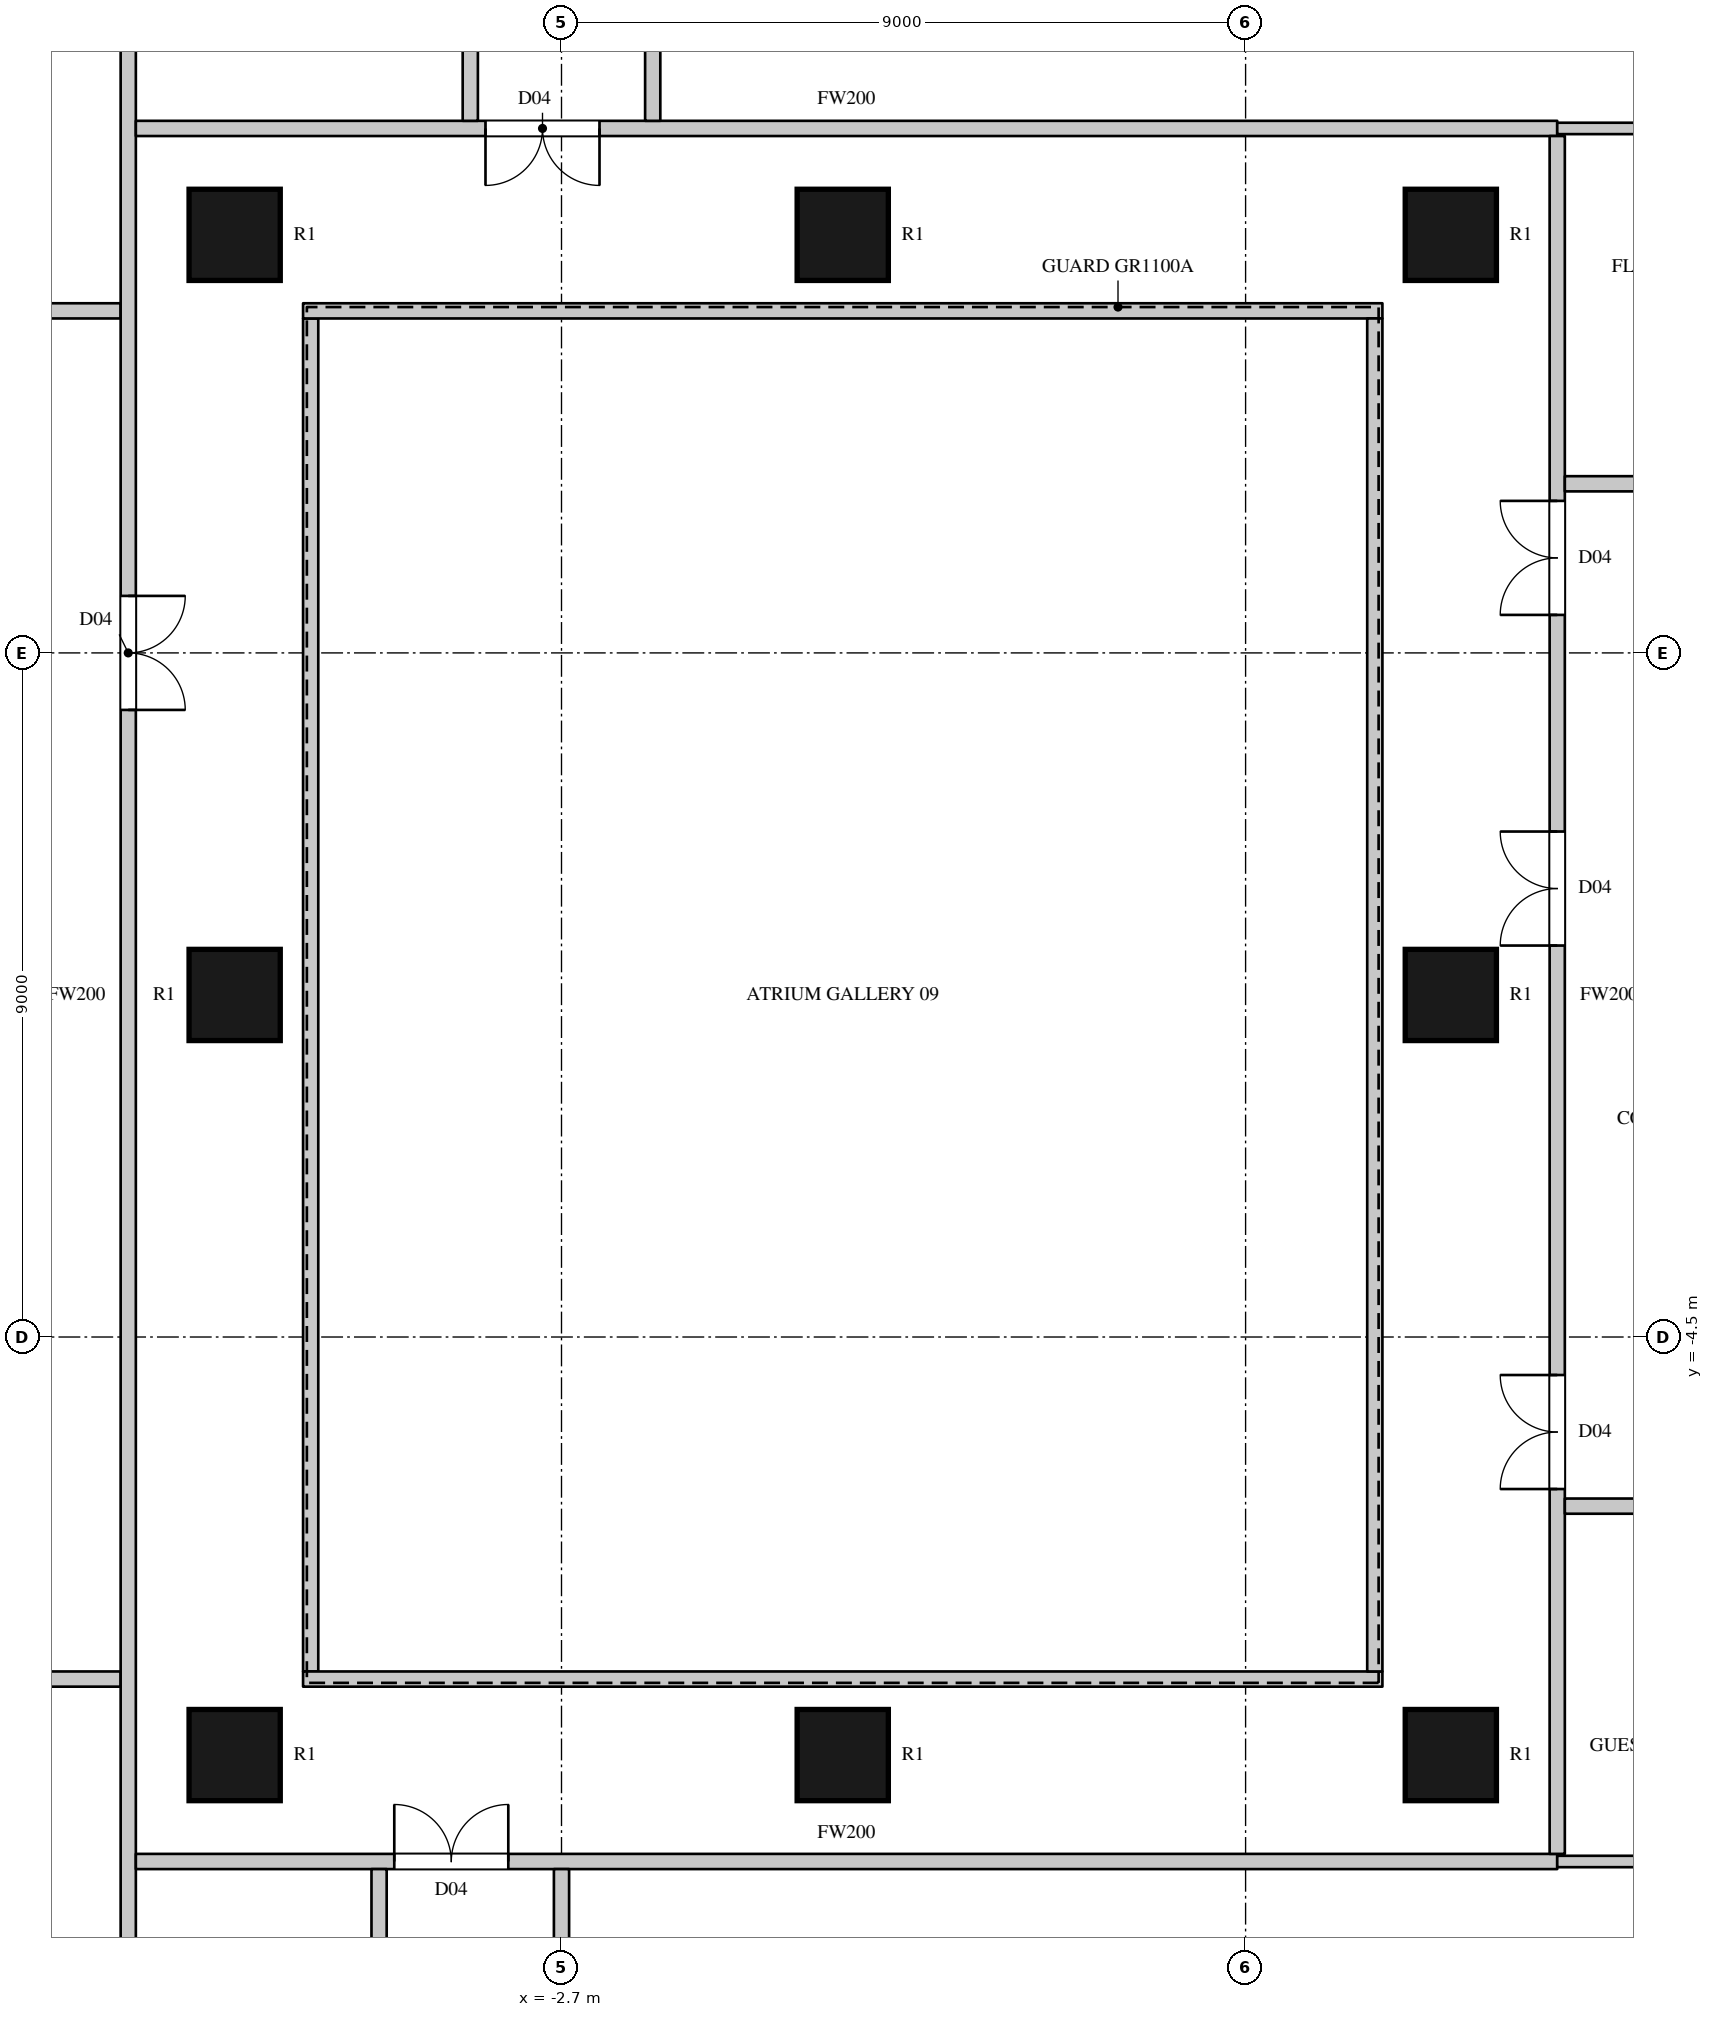
"""IFC4 building model, lengths in metres.
Left out: names, types, materials, properties, quantities, classifications, styles, units other than length and angle.
Written with IfcOpenShell. Run it as: python <this file> out.ifc"""

import sys

from ifc_helpers import new_model, si_unit, direction, frame, frame_2d, origin, origin_2d, place, context, subcontext, project, spatial, rectangle, circle, extrude, element, fill, save


model = new_model("IFC4")
c1 = context("Model", 3, precision=1e-05, world=origin(), true_north=direction((0.0, 1.0)))
c2 = subcontext(c1, "Body", "Model", "MODEL_VIEW")
j1 = project(units=[si_unit("LENGTHUNIT", "METRE"), si_unit("PLANEANGLEUNIT", "RADIAN")], contexts=[c1])
p1 = place(None, origin())
s1 = spatial("IfcSite", under=j1, at=p1, CompositionType="ELEMENT")
p2 = place(p1, origin())
s2 = spatial("IfcBuilding", under=s1, at=p2, CompositionType="ELEMENT")
p3 = place(p2, frame((0.0, 0.0, 62.7)))
s3 = spatial("IfcBuildingStorey", under=s2, at=p3, CompositionType="ELEMENT", Elevation=62.7)
for number, where, z_axis, x_axis in (
    (1, (-7.0, -10.0, 0.0), (0.0, 0.0, 1.0), (1.0, 0.0, 0.0)),
    (2, (-7.0, 0.0, 0.0), (0.0, 0.0, 1.0), (1.0, 0.0, 0.0)),
    (3, (-7.0, 10.0, 0.0), (0.0, 0.0, 1.0), (1.0, 0.0, 0.0)),
    (4, (1.0, -10.0, 0.0), (0.0, 0.0, 1.0), (1.0, 0.0, 0.0)),
    (5, (1.0, 10.0, 0.0), (0.0, 0.0, 1.0), (1.0, 0.0, 0.0)),
    (6, (9.0, -10.0, 0.0), (0.0, 0.0, 1.0), (1.0, 0.0, 0.0)),
    (7, (9.0, 0.0, 0.0), (0.0, 0.0, 1.0), (1.0, 0.0, 0.0)),
    (8, (9.0, 10.0, 0.0), (0.0, 0.0, 1.0), (1.0, 0.0, 0.0)),
):
    element("IfcColumn", number, at=place(p3, frame(where, z_axis=z_axis, x_axis=x_axis)), inside=s3, PredefinedType="COLUMN", context=c2, shape_type="SweptSolid", body=[
        extrude(circle(Radius=0.6, at=origin_2d()), origin(), (0.0, 0.0, 1.0), 3.6),
    ])
p4 = place(p3, frame((-13.97, -9.0, 0.0), z_axis=(0.0, 0.0, 1.0), x_axis=(1.0, 0.0, 0.0)))
e9 = element("IfcWall", 9, at=p4, inside=s3, PredefinedType="PARTITIONING", context=c2, shape_type="SweptSolid", body=[
    extrude(rectangle(XDim=5.47, YDim=0.2, at=frame_2d((2.735, 0.0))), origin(), (0.0, 0.0, 1.0), 3.3),
])
p5 = place(p4, frame((0.4, 0.0, 0.0)))
e10 = element("IfcOpeningElement", 10, at=p5, cuts=e9, PredefinedType="OPENING", context=c2, shape_type="SweptSolid", body=[
    extrude(rectangle(XDim=1.5, YDim=2.2, at=frame_2d((0.75, 1.1))), frame((0.0, 0.11, 0.0), z_axis=(0.0, -1.0, 0.0), x_axis=(1.0, 0.0, 0.0)), (0.0, 0.0, 1.0), 0.22),
])
p6 = place(p4, frame((2.05, 0.0, 0.0)))
e11 = element("IfcOpeningElement", 11, at=p6, cuts=e9, PredefinedType="OPENING", context=c2, shape_type="SweptSolid", body=[
    extrude(rectangle(XDim=1.5, YDim=2.2, at=frame_2d((0.75, 1.1))), frame((0.0, 0.11, 0.0), z_axis=(0.0, -1.0, 0.0), x_axis=(1.0, 0.0, 0.0)), (0.0, 0.0, 1.0), 0.22),
])
p7 = place(p3, frame((-13.97, 9.0, 0.0), z_axis=(0.0, 0.0, 1.0), x_axis=(1.0, 0.0, 0.0)))
e12 = element("IfcWall", 12, at=p7, inside=s3, PredefinedType="PARTITIONING", context=c2, shape_type="SweptSolid", body=[
    extrude(rectangle(XDim=5.47, YDim=0.2, at=frame_2d((2.735, 0.0))), origin(), (0.0, 0.0, 1.0), 3.3),
])
p8 = place(p3, frame((-8.4, -15.3, 0.0), z_axis=(0.0, 0.0, 1.0), x_axis=(0.0, 1.0, 0.0)))
e13 = element("IfcWall", 13, at=p8, inside=s3, PredefinedType="PARTITIONING", context=c2, shape_type="SweptSolid", body=[
    extrude(rectangle(XDim=30.6, YDim=0.2, at=frame_2d((15.3, 0.0))), origin(), (0.0, 0.0, 1.0), 3.3),
])
p9 = place(p8, frame((19.05, 0.0, 0.0)))
e14 = element("IfcOpeningElement", 14, at=p9, cuts=e13, PredefinedType="OPENING", context=c2, shape_type="SweptSolid", body=[
    extrude(rectangle(XDim=1.5, YDim=2.2, at=frame_2d((0.75, 1.1))), frame((0.0, 0.11, 0.0), z_axis=(0.0, -1.0, 0.0), x_axis=(1.0, 0.0, 0.0)), (0.0, 0.0, 1.0), 0.22),
])
p10 = place(p8, frame((29.55, 0.0, 0.0)))
e15 = element("IfcOpeningElement", 15, at=p10, cuts=e13, PredefinedType="OPENING", context=c2, shape_type="SweptSolid", body=[
    extrude(rectangle(XDim=0.9, YDim=2.2, at=frame_2d((0.45, 1.1))), frame((0.0, 0.11, 0.0), z_axis=(0.0, -1.0, 0.0), x_axis=(1.0, 0.0, 0.0)), (0.0, 0.0, 1.0), 0.22),
])
p11 = place(p8, frame((0.15, 0.0, 0.0)))
e16 = element("IfcOpeningElement", 16, at=p11, cuts=e13, PredefinedType="OPENING", context=c2, shape_type="SweptSolid", body=[
    extrude(rectangle(XDim=0.9, YDim=2.2, at=frame_2d((0.45, 1.1))), frame((0.0, 0.11, 0.0), z_axis=(0.0, -1.0, 0.0), x_axis=(1.0, 0.0, 0.0)), (0.0, 0.0, 1.0), 0.22),
])
p12 = place(p3, frame((-8.3, -11.4, 0.0), z_axis=(0.0, 0.0, 1.0), x_axis=(1.0, 0.0, 0.0)))
e17 = element("IfcWall", 17, at=p12, inside=s3, PredefinedType="PARTITIONING", context=c2, shape_type="SweptSolid", body=[
    extrude(rectangle(XDim=18.7, YDim=0.2, at=frame_2d((9.35, 0.0))), origin(), (0.0, 0.0, 1.0), 3.3),
])
p13 = place(p12, frame((3.4, 0.0, 0.0)))
e18 = element("IfcOpeningElement", 18, at=p13, cuts=e17, PredefinedType="OPENING", context=c2, shape_type="SweptSolid", body=[
    extrude(rectangle(XDim=1.5, YDim=2.2, at=frame_2d((0.75, 1.1))), frame((0.0, 0.11, 0.0), z_axis=(0.0, -1.0, 0.0), x_axis=(1.0, 0.0, 0.0)), (0.0, 0.0, 1.0), 0.22),
])
p14 = place(p3, frame((-8.3, 11.4, 0.0), z_axis=(0.0, 0.0, 1.0), x_axis=(1.0, 0.0, 0.0)))
e19 = element("IfcWall", 19, at=p14, inside=s3, PredefinedType="PARTITIONING", context=c2, shape_type="SweptSolid", body=[
    extrude(rectangle(XDim=18.7, YDim=0.2, at=frame_2d((9.35, 0.0))), origin(), (0.0, 0.0, 1.0), 3.3),
])
p15 = place(p14, frame((4.6, 0.0, 0.0)))
e20 = element("IfcOpeningElement", 20, at=p15, cuts=e19, PredefinedType="OPENING", context=c2, shape_type="SweptSolid", body=[
    extrude(rectangle(XDim=1.5, YDim=2.2, at=frame_2d((0.75, 1.1))), frame((0.0, 0.11, 0.0), z_axis=(0.0, -1.0, 0.0), x_axis=(1.0, 0.0, 0.0)), (0.0, 0.0, 1.0), 0.22),
])
p16 = place(p3, frame((-6.0, -8.9, 0.0), z_axis=(0.0, 0.0, 1.0), x_axis=(0.0, 1.0, 0.0)))
e21 = element("IfcWall", 21, at=p16, inside=s3, PredefinedType="PARTITIONING", context=c2, shape_type="SweptSolid", body=[
    extrude(rectangle(XDim=17.8, YDim=0.2, at=frame_2d((8.9, 0.0))), origin(), (0.0, 0.0, 1.0), 3.3),
])
for number, where, z_axis, x_axis in (
    (22, (-6.1, -9.0, 0.0), (0.0, 0.0, 1.0), (1.0, 0.0, 0.0)),
    (23, (-6.1, 9.0, 0.0), (0.0, 0.0, 1.0), (1.0, 0.0, 0.0)),
):
    element("IfcWall", number, at=place(p3, frame(where, z_axis=z_axis, x_axis=x_axis)), inside=s3, PredefinedType="PARTITIONING", context=c2, shape_type="SweptSolid", body=[
        extrude(rectangle(XDim=14.2, YDim=0.2, at=frame_2d((7.1, 0.0))), origin(), (0.0, 0.0, 1.0), 3.3),
    ])
for number, where, z_axis, x_axis in (
    (24, (-5.1, -15.3, 0.0), (0.0, 0.0, 1.0), (0.0, 1.0, 0.0)),
    (25, (-3.9, 11.5, 0.0), (0.0, 0.0, 1.0), (0.0, 1.0, 0.0)),
):
    element("IfcWall", number, at=place(p3, frame(where, z_axis=z_axis, x_axis=x_axis)), inside=s3, PredefinedType="PARTITIONING", context=c2, shape_type="SweptSolid", body=[
        extrude(rectangle(XDim=3.8, YDim=0.2, at=frame_2d((1.9, 0.0))), origin(), (0.0, 0.0, 1.0), 3.3),
    ])
p17 = place(p3, frame((-2.7, -15.3, 0.0), z_axis=(0.0, 0.0, 1.0), x_axis=(0.0, 1.0, 0.0)))
e26 = element("IfcWall", 26, at=p17, inside=s3, PredefinedType="PARTITIONING", context=c2, shape_type="SweptSolid", body=[
    extrude(rectangle(XDim=3.8, YDim=0.2, at=frame_2d((1.9, 0.0))), origin(), (0.0, 0.0, 1.0), 2.75),
])
p18 = place(p17, frame((0.15, 0.0, 0.0)))
e27 = element("IfcOpeningElement", 27, at=p18, cuts=e26, PredefinedType="OPENING", context=c2, shape_type="SweptSolid", body=[
    extrude(rectangle(XDim=0.9, YDim=2.2, at=frame_2d((0.45, 1.1))), frame((0.0, 0.11, 0.0), z_axis=(0.0, -1.0, 0.0), x_axis=(1.0, 0.0, 0.0)), (0.0, 0.0, 1.0), 0.22),
])
p19 = place(p3, frame((-1.5, 11.5, 0.0), z_axis=(0.0, 0.0, 1.0), x_axis=(0.0, 1.0, 0.0)))
e28 = element("IfcWall", 28, at=p19, inside=s3, PredefinedType="PARTITIONING", context=c2, shape_type="SweptSolid", body=[
    extrude(rectangle(XDim=3.8, YDim=0.2, at=frame_2d((1.9, 0.0))), origin(), (0.0, 0.0, 1.0), 3.3),
])
p20 = place(p19, frame((2.75, 0.0, 0.0)))
e29 = element("IfcOpeningElement", 29, at=p20, cuts=e28, PredefinedType="OPENING", context=c2, shape_type="SweptSolid", body=[
    extrude(rectangle(XDim=0.9, YDim=2.2, at=frame_2d((0.45, 1.1))), frame((0.0, 0.11, 0.0), z_axis=(0.0, -1.0, 0.0), x_axis=(1.0, 0.0, 0.0)), (0.0, 0.0, 1.0), 0.22),
])
p21 = place(p3, frame((8.0, -8.9, 0.0), z_axis=(0.0, 0.0, 1.0), x_axis=(0.0, 1.0, 0.0)))
e30 = element("IfcWall", 30, at=p21, inside=s3, PredefinedType="PARTITIONING", context=c2, shape_type="SweptSolid", body=[
    extrude(rectangle(XDim=17.8, YDim=0.2, at=frame_2d((8.9, 0.0))), origin(), (0.0, 0.0, 1.0), 3.3),
])
p22 = place(p3, frame((10.4, -11.3, 0.0), z_axis=(0.0, 0.0, 1.0), x_axis=(0.0, 1.0, 0.0)))
e31 = element("IfcWall", 31, at=p22, inside=s3, PredefinedType="PARTITIONING", context=c2, shape_type="SweptSolid", body=[
    extrude(rectangle(XDim=22.6, YDim=0.2, at=frame_2d((11.3, 0.0))), origin(), (0.0, 0.0, 1.0), 3.3),
])
p23 = place(p22, frame((4.8, 0.0, 0.0)))
e32 = element("IfcOpeningElement", 32, at=p23, cuts=e31, PredefinedType="OPENING", context=c2, shape_type="SweptSolid", body=[
    extrude(rectangle(XDim=1.5, YDim=2.2, at=frame_2d((0.75, 1.1))), frame((0.0, 0.11, 0.0), z_axis=(0.0, -1.0, 0.0), x_axis=(1.0, 0.0, 0.0)), (0.0, 0.0, 1.0), 0.22),
])
p24 = place(p22, frame((16.3, 0.0, 0.0)))
e33 = element("IfcOpeningElement", 33, at=p24, cuts=e31, PredefinedType="OPENING", context=c2, shape_type="SweptSolid", body=[
    extrude(rectangle(XDim=1.5, YDim=2.2, at=frame_2d((0.75, 1.1))), frame((0.0, 0.11, 0.0), z_axis=(0.0, -1.0, 0.0), x_axis=(1.0, 0.0, 0.0)), (0.0, 0.0, 1.0), 0.22),
])
p25 = place(p22, frame((11.95, 0.0, 0.0)))
e34 = element("IfcOpeningElement", 34, at=p25, cuts=e31, PredefinedType="OPENING", context=c2, shape_type="SweptSolid", body=[
    extrude(rectangle(XDim=1.5, YDim=2.2, at=frame_2d((0.75, 1.1))), frame((0.0, 0.11, 0.0), z_axis=(0.0, -1.0, 0.0), x_axis=(1.0, 0.0, 0.0)), (0.0, 0.0, 1.0), 0.22),
])
p26 = place(p3, frame((10.5, -6.725, 0.0), z_axis=(0.0, 0.0, 1.0), x_axis=(1.0, 0.0, 0.0)))
e35 = element("IfcWall", 35, at=p26, inside=s3, PredefinedType="PARTITIONING", context=c2, shape_type="SweptSolid", body=[
    extrude(rectangle(XDim=3.6, YDim=0.2, at=frame_2d((1.8, 0.0))), origin(), (0.0, 0.0, 1.0), 3.3),
])
p27 = place(p26, frame((1.65, 0.0, 0.0)))
e36 = element("IfcOpeningElement", 36, at=p27, cuts=e35, PredefinedType="OPENING", context=c2, shape_type="SweptSolid", body=[
    extrude(rectangle(XDim=1.6, YDim=2.4, at=frame_2d((0.8, 1.2))), frame((0.0, 0.11, 0.0), z_axis=(0.0, -1.0, 0.0), x_axis=(1.0, 0.0, 0.0)), (0.0, 0.0, 1.0), 0.22),
])
p28 = place(p3, frame((10.5, 6.725, 0.0), z_axis=(0.0, 0.0, 1.0), x_axis=(1.0, 0.0, 0.0)))
e37 = element("IfcWall", 37, at=p28, inside=s3, PredefinedType="PARTITIONING", context=c2, shape_type="SweptSolid", body=[
    extrude(rectangle(XDim=3.6, YDim=0.2, at=frame_2d((1.8, 0.0))), origin(), (0.0, 0.0, 1.0), 3.3),
])
p29 = place(p28, frame((2.3, 0.0, 0.0)))
e38 = element("IfcOpeningElement", 38, at=p29, cuts=e37, PredefinedType="OPENING", context=c2, shape_type="SweptSolid", body=[
    extrude(rectangle(XDim=0.95, YDim=2.2, at=frame_2d((0.475, 1.1))), frame((0.0, 0.11, 0.0), z_axis=(0.0, -1.0, 0.0), x_axis=(1.0, 0.0, 0.0)), (0.0, 0.0, 1.0), 0.22),
])
for number, where, z_axis, x_axis in (
    (39, (10.4, -11.4, 0.0), (0.0, 0.0, 1.0), (1.0, 0.0, 0.0)),
    (40, (10.4, 11.4, 0.0), (0.0, 0.0, 1.0), (1.0, 0.0, 0.0)),
):
    element("IfcWall", number, at=place(p3, frame(where, z_axis=z_axis, x_axis=x_axis)), inside=s3, PredefinedType="PARTITIONING", context=c2, shape_type="SweptSolid", body=[
        extrude(rectangle(XDim=3.5, YDim=0.15, at=frame_2d((1.75, 0.0))), origin(), (0.0, 0.0, 1.0), 3.3),
    ])
p30 = place(p9, origin())
e41 = element("IfcDoor", 41, at=p30, inside=s3, OperationType="DOUBLE_DOOR_SINGLE_SWING", PredefinedType="DOOR", context=c2, shape_type="SweptSolid", body=[
    extrude(rectangle(XDim=1.5, YDim=2.2, at=frame_2d((0.75, 1.1))), frame((0.0, 0.025, 0.0), z_axis=(0.0, -1.0, 0.0), x_axis=(1.0, 0.0, 0.0)), (0.0, 0.0, 1.0), 0.05),
])
fill(e14, e41)
p31 = place(p13, origin())
e42 = element("IfcDoor", 42, at=p31, inside=s3, OperationType="DOUBLE_DOOR_SINGLE_SWING", PredefinedType="DOOR", context=c2, shape_type="SweptSolid", body=[
    extrude(rectangle(XDim=1.5, YDim=2.2, at=frame_2d((0.75, 1.1))), frame((0.0, 0.025, 0.0), z_axis=(0.0, -1.0, 0.0), x_axis=(1.0, 0.0, 0.0)), (0.0, 0.0, 1.0), 0.05),
])
fill(e18, e42)
p32 = place(p15, origin())
e43 = element("IfcDoor", 43, at=p32, inside=s3, OperationType="DOUBLE_DOOR_SINGLE_SWING", PredefinedType="DOOR", context=c2, shape_type="SweptSolid", body=[
    extrude(rectangle(XDim=1.5, YDim=2.2, at=frame_2d((0.75, 1.1))), frame((0.0, 0.025, 0.0), z_axis=(0.0, -1.0, 0.0), x_axis=(1.0, 0.0, 0.0)), (0.0, 0.0, 1.0), 0.05),
])
fill(e20, e43)
p33 = place(p23, origin())
e44 = element("IfcDoor", 44, at=p33, inside=s3, OperationType="DOUBLE_DOOR_SINGLE_SWING", PredefinedType="DOOR", context=c2, shape_type="SweptSolid", body=[
    extrude(rectangle(XDim=1.5, YDim=2.2, at=frame_2d((0.75, 1.1))), frame((0.0, 0.025, 0.0), z_axis=(0.0, -1.0, 0.0), x_axis=(1.0, 0.0, 0.0)), (0.0, 0.0, 1.0), 0.05),
])
fill(e32, e44)
p34 = place(p24, origin())
e45 = element("IfcDoor", 45, at=p34, inside=s3, OperationType="DOUBLE_DOOR_SINGLE_SWING", PredefinedType="DOOR", context=c2, shape_type="SweptSolid", body=[
    extrude(rectangle(XDim=1.5, YDim=2.2, at=frame_2d((0.75, 1.1))), frame((0.0, 0.025, 0.0), z_axis=(0.0, -1.0, 0.0), x_axis=(1.0, 0.0, 0.0)), (0.0, 0.0, 1.0), 0.05),
])
fill(e33, e45)
p35 = place(p25, origin())
e46 = element("IfcDoor", 46, at=p35, inside=s3, OperationType="DOUBLE_DOOR_SINGLE_SWING", PredefinedType="DOOR", context=c2, shape_type="SweptSolid", body=[
    extrude(rectangle(XDim=1.5, YDim=2.2, at=frame_2d((0.75, 1.1))), frame((0.0, 0.025, 0.0), z_axis=(0.0, -1.0, 0.0), x_axis=(1.0, 0.0, 0.0)), (0.0, 0.0, 1.0), 0.05),
])
fill(e34, e46)
save(model, sys.argv[1])
